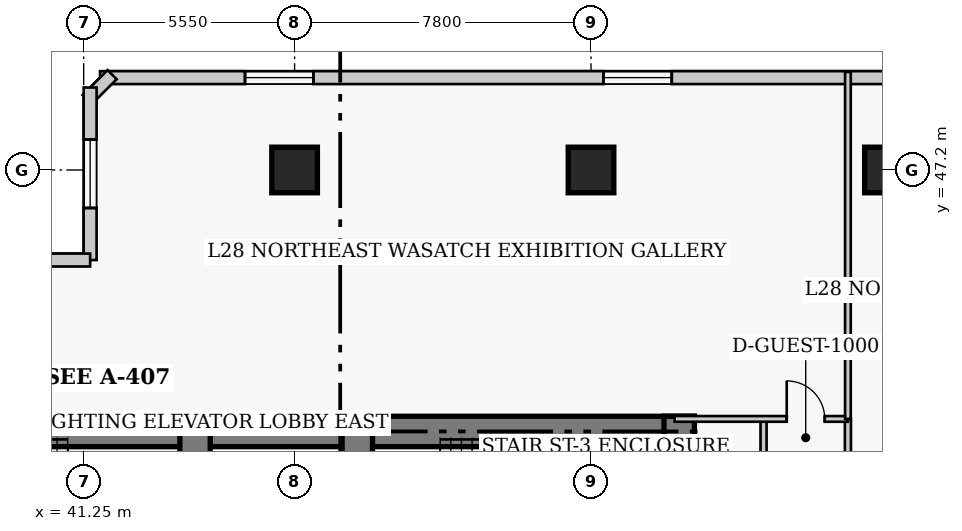
"""IFC4 building model, lengths in metres.
Left out: names, types, materials, properties, quantities, classifications, styles, units other than length and angle.
Written with IfcOpenShell. Run it as: python <this file> out.ifc"""

import sys

from ifc_helpers import new_model, si_unit, direction, frame, frame_2d, origin, origin_2d, place, context, subcontext, project, spatial, rectangle, extrude, element, fill, save


model = new_model("IFC4")
c1 = context("Model", 3, precision=1e-05, world=origin(), true_north=direction((0.0, 1.0)))
c2 = subcontext(c1, "Body", "Model", "MODEL_VIEW")
j1 = project(units=[si_unit("LENGTHUNIT", "METRE"), si_unit("PLANEANGLEUNIT", "RADIAN")], contexts=[c1])
p1 = place(None, origin())
s1 = spatial("IfcSite", under=j1, at=p1, CompositionType="ELEMENT")
p2 = place(p1, origin())
s2 = spatial("IfcBuilding", under=s1, at=p2, CompositionType="ELEMENT")
p3 = place(p2, frame((0.0, 0.0, 114.6)))
s3 = spatial("IfcBuildingStorey", under=s2, at=p3, CompositionType="ELEMENT", Elevation=114.6)
p4 = place(p3, frame((35.85, 40.32, 0.0), z_axis=(0.0, 0.0, 1.0), x_axis=(1.0, 0.0, 0.0)))
e1 = element("IfcWall", 1, at=p4, inside=s3, PredefinedType="SHEAR", context=c2, shape_type="SweptSolid", body=[
    extrude(rectangle(XDim=12.6, YDim=0.8, at=frame_2d((6.3, 0.0))), origin(), (0.0, 0.0, 1.0), 3.8),
])
p5 = place(p3, frame((48.45, 40.32, 0.0), z_axis=(0.0, 0.0, 1.0), x_axis=(1.0, 0.0, 0.0)))
e2 = element("IfcWall", 2, at=p5, inside=s3, PredefinedType="SHEAR", context=c2, shape_type="SweptSolid", body=[
    extrude(rectangle(XDim=8.87, YDim=0.8, at=frame_2d((4.435, 0.0))), origin(), (0.0, 0.0, 1.0), 3.8),
])
p6 = place(p3, frame((56.92, 27.05, 0.0), z_axis=(0.0, 0.0, 1.0), x_axis=(0.0, 1.0, 0.0)))
e3 = element("IfcWall", 3, at=p6, inside=s3, PredefinedType="SHEAR", context=c2, shape_type="SweptSolid", body=[
    extrude(rectangle(XDim=13.67, YDim=0.8, at=frame_2d((6.835, 0.0))), origin(), (0.0, 0.0, 1.0), 3.8),
])
p7 = place(p3, frame((44.18, 36.37, 0.0), z_axis=(0.0, 0.0, 1.0), x_axis=(0.0, 1.0, 0.0)))
e4 = element("IfcWall", 4, at=p7, inside=s3, PredefinedType="SHEAR", context=c2, shape_type="SweptSolid", body=[
    extrude(rectangle(XDim=3.95, YDim=0.8, at=frame_2d((1.975, 0.0))), origin(), (0.0, 0.0, 1.0), 3.8),
])
p8 = place(p3, frame((48.45, 32.35, 0.0), z_axis=(0.0, 0.0, 1.0), x_axis=(0.0, 1.0, 0.0)))
e5 = element("IfcWall", 5, at=p8, inside=s3, PredefinedType="SHEAR", context=c2, shape_type="SweptSolid", body=[
    extrude(rectangle(XDim=7.97, YDim=0.8, at=frame_2d((3.985, 0.0))), origin(), (0.0, 0.0, 1.0), 3.8),
])
p9 = place(p8, frame((5.85, 0.0, 0.0)))
e6 = element("IfcOpeningElement", 6, at=p9, cuts=e5, PredefinedType="OPENING", context=c2, shape_type="SweptSolid", body=[
    extrude(rectangle(XDim=1.1, YDim=2.15, at=frame_2d((0.55, 1.075))), frame((0.0, 0.41, 0.0), z_axis=(0.0, -1.0, 0.0), x_axis=(1.0, 0.0, 0.0)), (0.0, 0.0, 1.0), 0.82),
])
for number, where, z_axis, x_axis in (
    (7, (46.8, 47.2, 0.0), (0.0, 0.0, 1.0), (1.0, 0.0, 0.0)),
    (8, (54.6, 47.2, 0.0), (0.0, 0.0, 1.0), (1.0, 0.0, 0.0)),
    (9, (62.4, 47.2, 0.0), (0.0, 0.0, 1.0), (1.0, 0.0, 0.0)),
):
    element("IfcColumn", number, at=place(p3, frame(where, z_axis=z_axis, x_axis=x_axis)), inside=s3, PredefinedType="COLUMN", context=c2, shape_type="SweptSolid", body=[
        extrude(rectangle(XDim=1.2, YDim=1.2, at=origin_2d()), origin(), (0.0, 0.0, 1.0), 3.8),
    ])
p10 = place(p3, frame((69.97, 49.63, 0.0), z_axis=(0.0, 0.0, 1.0), x_axis=(-1.0, 0.0, 0.0)))
e10 = element("IfcWall", 10, at=p10, inside=s3, PredefinedType="SOLIDWALL", context=c2, shape_type="SweptSolid", body=[
    extrude(rectangle(XDim=28.29, YDim=0.34, at=frame_2d((14.145, 0.0))), origin(), (0.0, 0.0, 1.0), 3.54),
])
p11 = place(p10, frame((3.815, 0.0, 0.85)))
e11 = element("IfcOpeningElement", 11, at=p11, cuts=e10, PredefinedType="OPENING", context=c2, shape_type="SweptSolid", body=[
    extrude(rectangle(XDim=1.8, YDim=1.8, at=frame_2d((0.9, 0.9))), frame((0.0, 0.18, 0.0), z_axis=(0.0, -1.0, 0.0), x_axis=(1.0, 0.0, 0.0)), (0.0, 0.0, 1.0), 0.36),
])
p12 = place(p10, frame((13.245, 0.0, 0.85)))
e12 = element("IfcOpeningElement", 12, at=p12, cuts=e10, PredefinedType="OPENING", context=c2, shape_type="SweptSolid", body=[
    extrude(rectangle(XDim=1.8, YDim=1.8, at=frame_2d((0.9, 0.9))), frame((0.0, 0.18, 0.0), z_axis=(0.0, -1.0, 0.0), x_axis=(1.0, 0.0, 0.0)), (0.0, 0.0, 1.0), 0.36),
])
p13 = place(p10, frame((22.675, 0.0, 0.85)))
e13 = element("IfcOpeningElement", 13, at=p13, cuts=e10, PredefinedType="OPENING", context=c2, shape_type="SweptSolid", body=[
    extrude(rectangle(XDim=1.8, YDim=1.8, at=frame_2d((0.9, 0.9))), frame((0.0, 0.18, 0.0), z_axis=(0.0, -1.0, 0.0), x_axis=(1.0, 0.0, 0.0)), (0.0, 0.0, 1.0), 0.36),
])
p14 = place(p3, frame((41.999, 49.708, 0.0), z_axis=(0.0, 0.0, 1.0), x_axis=(-0.707238225886, -0.706975312048, 0.0)))
e14 = element("IfcWall", 14, at=p14, inside=s3, PredefinedType="SOLIDWALL", context=c2, shape_type="SweptSolid", body=[
    extrude(rectangle(XDim=0.929, YDim=0.34, at=frame_2d((0.464, 0.0))), origin(), (0.0, 0.0, 1.0), 3.54),
])
p15 = place(p3, frame((41.42, 49.37, 0.0), z_axis=(0.0, 0.0, 1.0), x_axis=(0.0, -1.0, 0.0)))
e15 = element("IfcWall", 15, at=p15, inside=s3, PredefinedType="SOLIDWALL", context=c2, shape_type="SweptSolid", body=[
    extrude(rectangle(XDim=4.54, YDim=0.34, at=frame_2d((2.27, 0.0))), origin(), (0.0, 0.0, 1.0), 3.54),
])
p16 = place(p15, frame((1.37, 0.0, 0.85)))
e16 = element("IfcOpeningElement", 16, at=p16, cuts=e15, PredefinedType="OPENING", context=c2, shape_type="SweptSolid", body=[
    extrude(rectangle(XDim=1.8, YDim=1.8, at=frame_2d((0.9, 0.9))), frame((0.0, 0.18, 0.0), z_axis=(0.0, -1.0, 0.0), x_axis=(1.0, 0.0, 0.0)), (0.0, 0.0, 1.0), 0.36),
])
p17 = place(p3, frame((41.42, 44.83, 0.0), z_axis=(0.0, 0.0, 1.0), x_axis=(-1.0, 0.0, 0.0)))
e17 = element("IfcWall", 17, at=p17, inside=s3, PredefinedType="SOLIDWALL", context=c2, shape_type="SweptSolid", body=[
    extrude(rectangle(XDim=4.84, YDim=0.34, at=frame_2d((2.42, 0.0))), origin(), (0.0, 0.0, 1.0), 3.54),
])
p18 = place(p17, frame((1.52, 0.0, 0.85)))
e18 = element("IfcOpeningElement", 18, at=p18, cuts=e17, PredefinedType="OPENING", context=c2, shape_type="SweptSolid", body=[
    extrude(rectangle(XDim=1.8, YDim=1.8, at=frame_2d((0.9, 0.9))), frame((0.0, 0.18, 0.0), z_axis=(0.0, -1.0, 0.0), x_axis=(1.0, 0.0, 0.0)), (0.0, 0.0, 1.0), 0.36),
])
p19 = place(p3, frame((61.36, 11.85, 0.0), z_axis=(0.0, 0.0, 1.0), x_axis=(0.0, 1.0, 0.0)))
e19 = element("IfcWall", 19, at=p19, inside=s3, PredefinedType="PARTITIONING", context=c2, shape_type="SweptSolid", body=[
    extrude(rectangle(XDim=28.8, YDim=0.16, at=frame_2d((14.4, 0.0))), origin(), (0.0, 0.0, 1.0), 3.54),
])
p20 = place(p19, frame((3.6, 0.0, 0.0)))
e20 = element("IfcOpeningElement", 20, at=p20, cuts=e19, PredefinedType="OPENING", context=c2, shape_type="SweptSolid", body=[
    extrude(rectangle(XDim=0.95, YDim=2.1, at=frame_2d((0.475, 1.05))), frame((0.0, 0.09, 0.0), z_axis=(0.0, -1.0, 0.0), x_axis=(1.0, 0.0, 0.0)), (0.0, 0.0, 1.0), 0.18),
])
p21 = place(p19, frame((12.075, 0.0, 0.0)))
e21 = element("IfcOpeningElement", 21, at=p21, cuts=e19, PredefinedType="OPENING", context=c2, shape_type="SweptSolid", body=[
    extrude(rectangle(XDim=0.95, YDim=2.1, at=frame_2d((0.475, 1.05))), frame((0.0, 0.09, 0.0), z_axis=(0.0, -1.0, 0.0), x_axis=(1.0, 0.0, 0.0)), (0.0, 0.0, 1.0), 0.18),
])
p22 = place(p19, frame((19.875, 0.0, 0.0)))
e22 = element("IfcOpeningElement", 22, at=p22, cuts=e19, PredefinedType="OPENING", context=c2, shape_type="SweptSolid", body=[
    extrude(rectangle(XDim=0.95, YDim=2.1, at=frame_2d((0.475, 1.05))), frame((0.0, 0.09, 0.0), z_axis=(0.0, -1.0, 0.0), x_axis=(1.0, 0.0, 0.0)), (0.0, 0.0, 1.0), 0.18),
])
p23 = place(p19, frame((24.3, 0.0, 0.0)))
e23 = element("IfcOpeningElement", 23, at=p23, cuts=e19, PredefinedType="OPENING", context=c2, shape_type="SweptSolid", body=[
    extrude(rectangle(XDim=1.0, YDim=2.15, at=frame_2d((0.5, 1.075))), frame((0.0, 0.09, 0.0), z_axis=(0.0, -1.0, 0.0), x_axis=(1.0, 0.0, 0.0)), (0.0, 0.0, 1.0), 0.18),
])
p24 = place(p3, frame((59.14, 24.66, 0.0), z_axis=(0.0, 0.0, 1.0), x_axis=(0.0, 1.0, 0.0)))
e24 = element("IfcWall", 24, at=p24, inside=s3, PredefinedType="PARTITIONING", context=c2, shape_type="SweptSolid", body=[
    extrude(rectangle(XDim=15.99, YDim=0.16, at=frame_2d((7.995, 0.0))), origin(), (0.0, 0.0, 1.0), 3.54),
])
p25 = place(p3, frame((56.8, 40.65, 0.0), z_axis=(0.0, 0.0, 1.0), x_axis=(1.0, 0.0, 0.0)))
e25 = element("IfcWall", 25, at=p25, inside=s3, PredefinedType="PARTITIONING", context=c2, shape_type="SweptSolid", body=[
    extrude(rectangle(XDim=4.56, YDim=0.15, at=frame_2d((2.28, 0.0))), origin(), (0.0, 0.0, 1.0), 3.54),
])
p26 = place(p25, frame((2.95, 0.0, 0.0)))
e26 = element("IfcOpeningElement", 26, at=p26, cuts=e25, PredefinedType="OPENING", context=c2, shape_type="SweptSolid", body=[
    extrude(rectangle(XDim=1.0, YDim=2.15, at=frame_2d((0.5, 1.075))), frame((0.0, 0.085, 0.0), z_axis=(0.0, -1.0, 0.0), x_axis=(1.0, 0.0, 0.0)), (0.0, 0.0, 1.0), 0.17),
])
p27 = place(p3, frame((61.36, 40.65, 0.0), z_axis=(0.0, 0.0, 1.0), x_axis=(0.0, 1.0, 0.0)))
e27 = element("IfcWall", 27, at=p27, inside=s3, PredefinedType="PARTITIONING", context=c2, shape_type="SweptSolid", body=[
    extrude(rectangle(XDim=9.13, YDim=0.15, at=frame_2d((4.565, 0.0))), origin(), (0.0, 0.0, 1.0), 3.54),
])
p28 = place(p12, origin())
e28 = element("IfcWindow", 28, at=p28, inside=s3, PartitioningType="SINGLE_PANEL", PredefinedType="WINDOW", context=c2, shape_type="SweptSolid", body=[
    extrude(rectangle(XDim=1.8, YDim=1.8, at=frame_2d((0.9, 0.9))), frame((0.0, 0.03, 0.0), z_axis=(0.0, -1.0, 0.0), x_axis=(1.0, 0.0, 0.0)), (0.0, 0.0, 1.0), 0.06),
])
fill(e12, e28)
p29 = place(p13, origin())
e29 = element("IfcWindow", 29, at=p29, inside=s3, PartitioningType="SINGLE_PANEL", PredefinedType="WINDOW", context=c2, shape_type="SweptSolid", body=[
    extrude(rectangle(XDim=1.8, YDim=1.8, at=frame_2d((0.9, 0.9))), frame((0.0, 0.03, 0.0), z_axis=(0.0, -1.0, 0.0), x_axis=(1.0, 0.0, 0.0)), (0.0, 0.0, 1.0), 0.06),
])
fill(e13, e29)
p30 = place(p16, origin())
e30 = element("IfcWindow", 30, at=p30, inside=s3, PartitioningType="SINGLE_PANEL", PredefinedType="WINDOW", context=c2, shape_type="SweptSolid", body=[
    extrude(rectangle(XDim=1.8, YDim=1.8, at=frame_2d((0.9, 0.9))), frame((0.0, 0.03, 0.0), z_axis=(0.0, -1.0, 0.0), x_axis=(1.0, 0.0, 0.0)), (0.0, 0.0, 1.0), 0.06),
])
fill(e16, e30)
p31 = place(p26, origin())
e31 = element("IfcDoor", 31, at=p31, inside=s3, OperationType="SINGLE_SWING_LEFT", PredefinedType="DOOR", context=c2, shape_type="SweptSolid", body=[
    extrude(rectangle(XDim=1.0, YDim=2.15, at=frame_2d((0.5, 1.075))), frame((0.0, 0.025, 0.0), z_axis=(0.0, -1.0, 0.0), x_axis=(1.0, 0.0, 0.0)), (0.0, 0.0, 1.0), 0.05),
])
fill(e26, e31)
save(model, sys.argv[1])
